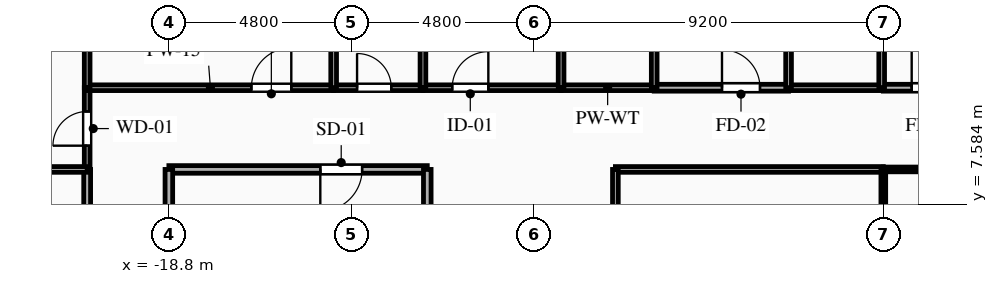
"""IFC4 building model, lengths in metres.
Left out: names, types, materials, properties, quantities, classifications, styles, units other than length and angle.
Written with IfcOpenShell. Run it as: python <this file> out.ifc"""

import sys

from ifc_helpers import new_model, si_unit, direction, frame, frame_2d, origin, place, context, subcontext, project, spatial, rectangle, extrude, element, fill, save


model = new_model("IFC4")
c1 = context("Model", 3, precision=1e-05, world=origin(), true_north=direction((0.0, 1.0)))
c2 = subcontext(c1, "Body", "Model", "MODEL_VIEW")
j1 = project(units=[si_unit("LENGTHUNIT", "METRE"), si_unit("PLANEANGLEUNIT", "RADIAN")], contexts=[c1])
p1 = place(None, origin())
s1 = spatial("IfcSite", under=j1, at=p1, CompositionType="ELEMENT")
p2 = place(p1, origin())
s2 = spatial("IfcBuilding", under=s1, at=p2, CompositionType="ELEMENT")
p3 = place(p2, frame((0.0, 0.0, 141.05)))
s3 = spatial("IfcBuildingStorey", under=s2, at=p3, CompositionType="ELEMENT", Elevation=141.05)
p4 = place(p3, frame((-12.0, 8.5, 0.0), z_axis=(0.0, 0.0, 1.0), x_axis=(-1.0, 0.0, 0.0)))
e1 = element("IfcWall", 1, at=p4, inside=s3, PredefinedType="PARTITIONING", context=c2, shape_type="SweptSolid", body=[
    extrude(rectangle(XDim=6.8, YDim=0.2, at=frame_2d((3.4, 0.0))), origin(), (0.0, 0.0, 1.0), 3.04),
])
p5 = place(p4, frame((1.715, 0.0, 0.0)))
e2 = element("IfcOpeningElement", 2, at=p5, cuts=e1, PredefinedType="OPENING", context=c2, shape_type="SweptSolid", body=[
    extrude(rectangle(XDim=1.1, YDim=2.15, at=frame_2d((0.55, 1.075))), frame((0.0, 0.11, 0.0), z_axis=(0.0, -1.0, 0.0), x_axis=(1.0, 0.0, 0.0)), (0.0, 0.0, 1.0), 0.22),
])
p6 = place(p3, frame((-18.8, 8.5, 0.0), z_axis=(0.0, 0.0, 1.0), x_axis=(0.0, -1.0, 0.0)))
e3 = element("IfcWall", 3, at=p6, inside=s3, PredefinedType="PARTITIONING", context=c2, shape_type="SweptSolid", body=[
    extrude(rectangle(XDim=2.9, YDim=0.2, at=frame_2d((1.45, 0.0))), origin(), (0.0, 0.0, 1.0), 2.525),
])
p7 = place(p3, frame((-12.0, 5.6, 0.0), z_axis=(0.0, 0.0, 1.0), x_axis=(0.0, 1.0, 0.0)))
e4 = element("IfcWall", 4, at=p7, inside=s3, PredefinedType="PARTITIONING", context=c2, shape_type="SweptSolid", body=[
    extrude(rectangle(XDim=2.9, YDim=0.2, at=frame_2d((1.45, 0.0))), origin(), (0.0, 0.0, 1.0), 3.04),
])
p8 = place(p3, frame((-20.95, 8.5, 0.0), z_axis=(0.0, 0.0, 1.0), x_axis=(0.0, 1.0, 0.0)))
e5 = element("IfcWall", 5, at=p8, inside=s3, PredefinedType="PARTITIONING", context=c2, shape_type="SweptSolid", body=[
    extrude(rectangle(XDim=2.15, YDim=0.15, at=frame_2d((1.075, 0.0))), origin(), (0.0, 0.0, 1.0), 3.04),
])
p9 = place(p8, frame((0.625, 0.0, 0.0)))
e6 = element("IfcOpeningElement", 6, at=p9, cuts=e5, PredefinedType="OPENING", context=c2, shape_type="SweptSolid", body=[
    extrude(rectangle(XDim=0.9, YDim=2.1, at=frame_2d((0.45, 1.05))), frame((0.0, 0.085, 0.0), z_axis=(0.0, -1.0, 0.0), x_axis=(1.0, 0.0, 0.0)), (0.0, 0.0, 1.0), 0.17),
])
p10 = place(p3, frame((-20.95, 10.65, 0.0), z_axis=(0.0, 0.0, 1.0), x_axis=(1.0, 0.0, 0.0)))
e7 = element("IfcWall", 7, at=p10, inside=s3, PredefinedType="PARTITIONING", context=c2, shape_type="SweptSolid", body=[
    extrude(rectangle(XDim=6.486, YDim=0.15, at=frame_2d((3.243, 0.0))), origin(), (0.0, 0.0, 1.0), 3.04),
])
p11 = place(p10, frame((4.322, 0.0, 0.0)))
e8 = element("IfcOpeningElement", 8, at=p11, cuts=e7, PredefinedType="OPENING", context=c2, shape_type="SweptSolid", body=[
    extrude(rectangle(XDim=1.05, YDim=2.15, at=frame_2d((0.525, 1.075))), frame((0.0, 0.085, 0.0), z_axis=(0.0, -1.0, 0.0), x_axis=(1.0, 0.0, 0.0)), (0.0, 0.0, 1.0), 0.17),
])
p12 = place(p3, frame((-14.464, 10.65, 0.0), z_axis=(0.0, 0.0, 1.0), x_axis=(1.0, 0.0, 0.0)))
e9 = element("IfcWall", 9, at=p12, inside=s3, PredefinedType="PLUMBINGWALL", context=c2, shape_type="SweptSolid", body=[
    extrude(rectangle(XDim=2.35, YDim=0.15, at=frame_2d((1.175, 0.0))), origin(), (0.0, 0.0, 1.0), 3.04),
])
p13 = place(p12, frame((0.616, 0.0, 0.0)))
e10 = element("IfcOpeningElement", 10, at=p13, cuts=e9, PredefinedType="OPENING", context=c2, shape_type="SweptSolid", body=[
    extrude(rectangle(XDim=0.9, YDim=2.1, at=frame_2d((0.45, 1.05))), frame((0.0, 0.085, 0.0), z_axis=(0.0, -1.0, 0.0), x_axis=(1.0, 0.0, 0.0)), (0.0, 0.0, 1.0), 0.17),
])
p14 = place(p3, frame((-12.114, 10.65, 0.0), z_axis=(0.0, 0.0, 1.0), x_axis=(1.0, 0.0, 0.0)))
e11 = element("IfcWall", 11, at=p14, inside=s3, PredefinedType="PARTITIONING", context=c2, shape_type="SweptSolid", body=[
    extrude(rectangle(XDim=3.635, YDim=0.15, at=frame_2d((1.817, 0.0))), origin(), (0.0, 0.0, 1.0), 3.04),
])
p15 = place(p14, frame((0.771, 0.0, 0.0)))
e12 = element("IfcOpeningElement", 12, at=p15, cuts=e11, PredefinedType="OPENING", context=c2, shape_type="SweptSolid", body=[
    extrude(rectangle(XDim=0.95, YDim=2.1, at=frame_2d((0.475, 1.05))), frame((0.0, 0.085, 0.0), z_axis=(0.0, -1.0, 0.0), x_axis=(1.0, 0.0, 0.0)), (0.0, 0.0, 1.0), 0.17),
])
p16 = place(p3, frame((-6.029, 10.65, 0.0), z_axis=(0.0, 0.0, 1.0), x_axis=(1.0, 0.0, 0.0)))
e13 = element("IfcWall", 13, at=p16, inside=s3, PredefinedType="PARTITIONING", context=c2, shape_type="SweptSolid", body=[
    extrude(rectangle(XDim=3.536, YDim=0.18, at=frame_2d((1.768, 0.0))), origin(), (0.0, 0.0, 1.0), 3.04),
])
p17 = place(p16, frame((1.784, 0.0, 0.0)))
e14 = element("IfcOpeningElement", 14, at=p17, cuts=e13, PredefinedType="OPENING", context=c2, shape_type="SweptSolid", body=[
    extrude(rectangle(XDim=1.0, YDim=2.15, at=frame_2d((0.5, 1.075))), frame((0.0, 0.1, 0.0), z_axis=(0.0, -1.0, 0.0), x_axis=(1.0, 0.0, 0.0)), (0.0, 0.0, 1.0), 0.2),
])
for number, where, z_axis, x_axis in (
    (15, (-8.479, 10.65, 0.0), (0.0, 0.0, 1.0), (1.0, 0.0, 0.0)),
    (16, (-2.493, 10.65, 0.0), (0.0, 0.0, 1.0), (1.0, 0.0, 0.0)),
):
    element("IfcWall", number, at=place(p3, frame(where, z_axis=z_axis, x_axis=x_axis)), inside=s3, PredefinedType="PLUMBINGWALL", context=c2, shape_type="SweptSolid", body=[
        extrude(rectangle(XDim=2.45, YDim=0.15, at=frame_2d((1.225, 0.0))), origin(), (0.0, 0.0, 1.0), 3.04),
    ])
p18 = place(p3, frame((0.0, 8.5, 0.0), z_axis=(0.0, 0.0, 1.0), x_axis=(-1.0, 0.0, 0.0)))
e17 = element("IfcWall", 17, at=p18, inside=s3, PredefinedType="PARTITIONING", context=c2, shape_type="SweptSolid", body=[
    extrude(rectangle(XDim=7.05, YDim=0.15, at=frame_2d((3.525, 0.0))), origin(), (0.0, 0.0, 1.0), 3.04),
])
p19 = place(p3, frame((0.0, 10.65, 0.0), z_axis=(0.0, 0.0, 1.0), x_axis=(1.0, 0.0, 0.0)))
e18 = element("IfcWall", 18, at=p19, inside=s3, PredefinedType="PARTITIONING", context=c2, shape_type="SweptSolid", body=[
    extrude(rectangle(XDim=3.493, YDim=0.18, at=frame_2d((1.747, 0.0))), origin(), (0.0, 0.0, 1.0), 3.04),
])
p20 = place(p19, frame((0.747, 0.0, 0.0)))
e19 = element("IfcOpeningElement", 19, at=p20, cuts=e18, PredefinedType="OPENING", context=c2, shape_type="SweptSolid", body=[
    extrude(rectangle(XDim=1.0, YDim=2.15, at=frame_2d((0.5, 1.075))), frame((0.0, 0.1, 0.0), z_axis=(0.0, -1.0, 0.0), x_axis=(1.0, 0.0, 0.0)), (0.0, 0.0, 1.0), 0.2),
])
p21 = place(p3, frame((7.05, 8.5, 0.0), z_axis=(0.0, 0.0, 1.0), x_axis=(-1.0, 0.0, 0.0)))
e20 = element("IfcWall", 20, at=p21, inside=s3, PredefinedType="PARTITIONING", context=c2, shape_type="SweptSolid", body=[
    extrude(rectangle(XDim=7.05, YDim=0.125, at=frame_2d((3.525, 0.0))), origin(), (0.0, 0.0, 1.0), 3.04),
])
p22 = place(p3, frame((-20.95, -5.6, 0.0), z_axis=(0.0, 0.0, 1.0), x_axis=(0.0, 1.0, 0.0)))
e21 = element("IfcWall", 21, at=p22, inside=s3, PredefinedType="PARTITIONING", context=c2, shape_type="SweptSolid", body=[
    extrude(rectangle(XDim=14.1, YDim=0.18, at=frame_2d((7.05, 0.0))), origin(), (0.0, 0.0, 1.0), 3.04),
])
p23 = place(p22, frame((5.058, 0.0, 0.0)))
e22 = element("IfcOpeningElement", 22, at=p23, cuts=e21, PredefinedType="OPENING", context=c2, shape_type="SweptSolid", body=[
    extrude(rectangle(XDim=1.0, YDim=2.15, at=frame_2d((0.5, 1.075))), frame((0.0, 0.1, 0.0), z_axis=(0.0, -1.0, 0.0), x_axis=(1.0, 0.0, 0.0)), (0.0, 0.0, 1.0), 0.2),
])
p24 = place(p3, frame((-7.05, 8.5, 0.0), z_axis=(0.0, 0.0, 1.0), x_axis=(0.0, -1.0, 0.0)))
e23 = element("IfcWall", 23, at=p24, inside=s3, PredefinedType="PARTITIONING", context=c2, shape_type="SweptSolid", body=[
    extrude(rectangle(XDim=9.3, YDim=0.15, at=frame_2d((4.65, 0.0))), origin(), (0.0, 0.0, 1.0), 3.04),
])
p25 = place(p24, frame((6.784, 0.0, 0.0)))
e24 = element("IfcOpeningElement", 24, at=p25, cuts=e23, PredefinedType="OPENING", context=c2, shape_type="SweptSolid", body=[
    extrude(rectangle(XDim=1.05, YDim=2.15, at=frame_2d((0.525, 1.075))), frame((0.0, 0.085, 0.0), z_axis=(0.0, -1.0, 0.0), x_axis=(1.0, 0.0, 0.0)), (0.0, 0.0, 1.0), 0.17),
])
p26 = place(p3, frame((-23.6, 8.5, 0.0), z_axis=(0.0, 0.0, 1.0), x_axis=(1.0, 0.0, 0.0)))
e25 = element("IfcWall", 25, at=p26, inside=s3, PredefinedType="PARTITIONING", context=c2, shape_type="SweptSolid", body=[
    extrude(rectangle(XDim=2.65, YDim=0.15, at=frame_2d((1.325, 0.0))), origin(), (0.0, 0.0, 1.0), 3.04),
])
p27 = place(p26, frame((0.635, 0.0, 0.0)))
e26 = element("IfcOpeningElement", 26, at=p27, cuts=e25, PredefinedType="OPENING", context=c2, shape_type="SweptSolid", body=[
    extrude(rectangle(XDim=1.05, YDim=2.15, at=frame_2d((0.525, 1.075))), frame((0.0, 0.085, 0.0), z_axis=(0.0, -1.0, 0.0), x_axis=(1.0, 0.0, 0.0)), (0.0, 0.0, 1.0), 0.17),
])
p28 = place(p3, frame((-20.95, 20.4, 0.0), z_axis=(0.0, 0.0, 1.0), x_axis=(0.0, -1.0, 0.0)))
e27 = element("IfcWall", 27, at=p28, inside=s3, PredefinedType="PARTITIONING", context=c2, shape_type="SweptSolid", body=[
    extrude(rectangle(XDim=9.75, YDim=0.15, at=frame_2d((4.875, 0.0))), origin(), (0.0, 0.0, 1.0), 3.04),
])
for number, where, z_axis, x_axis in (
    (28, (-14.464, 20.4, 0.0), (0.0, 0.0, 1.0), (0.0, -1.0, 0.0)),
    (29, (-12.114, 20.4, 0.0), (0.0, 0.0, 1.0), (0.0, -1.0, 0.0)),
):
    element("IfcWall", number, at=place(p3, frame(where, z_axis=z_axis, x_axis=x_axis)), inside=s3, PredefinedType="PLUMBINGWALL", context=c2, shape_type="SweptSolid", body=[
        extrude(rectangle(XDim=9.75, YDim=0.15, at=frame_2d((4.875, 0.0))), origin(), (0.0, 0.0, 1.0), 3.04),
    ])
for number, where, z_axis, x_axis in (
    (30, (-8.479, 12.8, 0.0), (0.0, 0.0, 1.0), (0.0, -1.0, 0.0)),
    (31, (-6.029, 10.65, 0.0), (0.0, 0.0, 1.0), (0.0, 1.0, 0.0)),
    (32, (-2.493, 12.8, 0.0), (0.0, 0.0, 1.0), (0.0, -1.0, 0.0)),
    (33, (-0.043, 10.65, 0.0), (0.0, 0.0, 1.0), (0.0, 1.0, 0.0)),
):
    element("IfcWall", number, at=place(p3, frame(where, z_axis=z_axis, x_axis=x_axis)), inside=s3, PredefinedType="PLUMBINGWALL", context=c2, shape_type="SweptSolid", body=[
        extrude(rectangle(XDim=2.15, YDim=0.15, at=frame_2d((1.075, 0.0))), origin(), (0.0, 0.0, 1.0), 3.04),
    ])
p29 = place(p3, frame((0.0, 8.5, 0.0), z_axis=(0.0, 0.0, 1.0), x_axis=(0.0, -1.0, 0.0)))
e34 = element("IfcWall", 34, at=p29, inside=s3, PredefinedType="PARTITIONING", context=c2, shape_type="SweptSolid", body=[
    extrude(rectangle(XDim=9.3, YDim=0.125, at=frame_2d((4.65, 0.0))), origin(), (0.0, 0.0, 1.0), 3.04),
])
p30 = place(p5, origin())
e35 = element("IfcDoor", 35, at=p30, inside=s3, OperationType="SINGLE_SWING_RIGHT", PredefinedType="DOOR", context=c2, shape_type="SweptSolid", body=[
    extrude(rectangle(XDim=1.1, YDim=2.15, at=frame_2d((0.55, 1.075))), frame((0.0, 0.025, 0.0), z_axis=(0.0, -1.0, 0.0), x_axis=(1.0, 0.0, 0.0)), (0.0, 0.0, 1.0), 0.05),
])
fill(e2, e35)
p31 = place(p9, origin())
e36 = element("IfcDoor", 36, at=p31, inside=s3, OperationType="SINGLE_SWING_LEFT", PredefinedType="DOOR", context=c2, shape_type="SweptSolid", body=[
    extrude(rectangle(XDim=0.9, YDim=2.1, at=frame_2d((0.45, 1.05))), frame((0.0, 0.025, 0.0), z_axis=(0.0, -1.0, 0.0), x_axis=(1.0, 0.0, 0.0)), (0.0, 0.0, 1.0), 0.05),
])
fill(e6, e36)
p32 = place(p11, origin())
e37 = element("IfcDoor", 37, at=p32, inside=s3, OperationType="SINGLE_SWING_RIGHT", PredefinedType="DOOR", context=c2, shape_type="SweptSolid", body=[
    extrude(rectangle(XDim=1.05, YDim=2.15, at=frame_2d((0.525, 1.075))), frame((0.0, 0.025, 0.0), z_axis=(0.0, -1.0, 0.0), x_axis=(1.0, 0.0, 0.0)), (0.0, 0.0, 1.0), 0.05),
])
fill(e8, e37)
p33 = place(p13, origin())
e38 = element("IfcDoor", 38, at=p33, inside=s3, OperationType="SINGLE_SWING_LEFT", PredefinedType="DOOR", context=c2, shape_type="SweptSolid", body=[
    extrude(rectangle(XDim=0.9, YDim=2.1, at=frame_2d((0.45, 1.05))), frame((0.0, 0.025, 0.0), z_axis=(0.0, -1.0, 0.0), x_axis=(1.0, 0.0, 0.0)), (0.0, 0.0, 1.0), 0.05),
])
fill(e10, e38)
p34 = place(p15, origin())
e39 = element("IfcDoor", 39, at=p34, inside=s3, OperationType="SINGLE_SWING_RIGHT", PredefinedType="DOOR", context=c2, shape_type="SweptSolid", body=[
    extrude(rectangle(XDim=0.95, YDim=2.1, at=frame_2d((0.475, 1.05))), frame((0.0, 0.025, 0.0), z_axis=(0.0, -1.0, 0.0), x_axis=(1.0, 0.0, 0.0)), (0.0, 0.0, 1.0), 0.05),
])
fill(e12, e39)
p35 = place(p17, origin())
e40 = element("IfcDoor", 40, at=p35, inside=s3, OperationType="SINGLE_SWING_LEFT", PredefinedType="DOOR", context=c2, shape_type="SweptSolid", body=[
    extrude(rectangle(XDim=1.0, YDim=2.15, at=frame_2d((0.5, 1.075))), frame((0.0, 0.025, 0.0), z_axis=(0.0, -1.0, 0.0), x_axis=(1.0, 0.0, 0.0)), (0.0, 0.0, 1.0), 0.05),
])
fill(e14, e40)
p36 = place(p20, origin())
e41 = element("IfcDoor", 41, at=p36, inside=s3, OperationType="SINGLE_SWING_LEFT", PredefinedType="DOOR", context=c2, shape_type="SweptSolid", body=[
    extrude(rectangle(XDim=1.0, YDim=2.15, at=frame_2d((0.5, 1.075))), frame((0.0, 0.025, 0.0), z_axis=(0.0, -1.0, 0.0), x_axis=(1.0, 0.0, 0.0)), (0.0, 0.0, 1.0), 0.05),
])
fill(e19, e41)
save(model, sys.argv[1])
